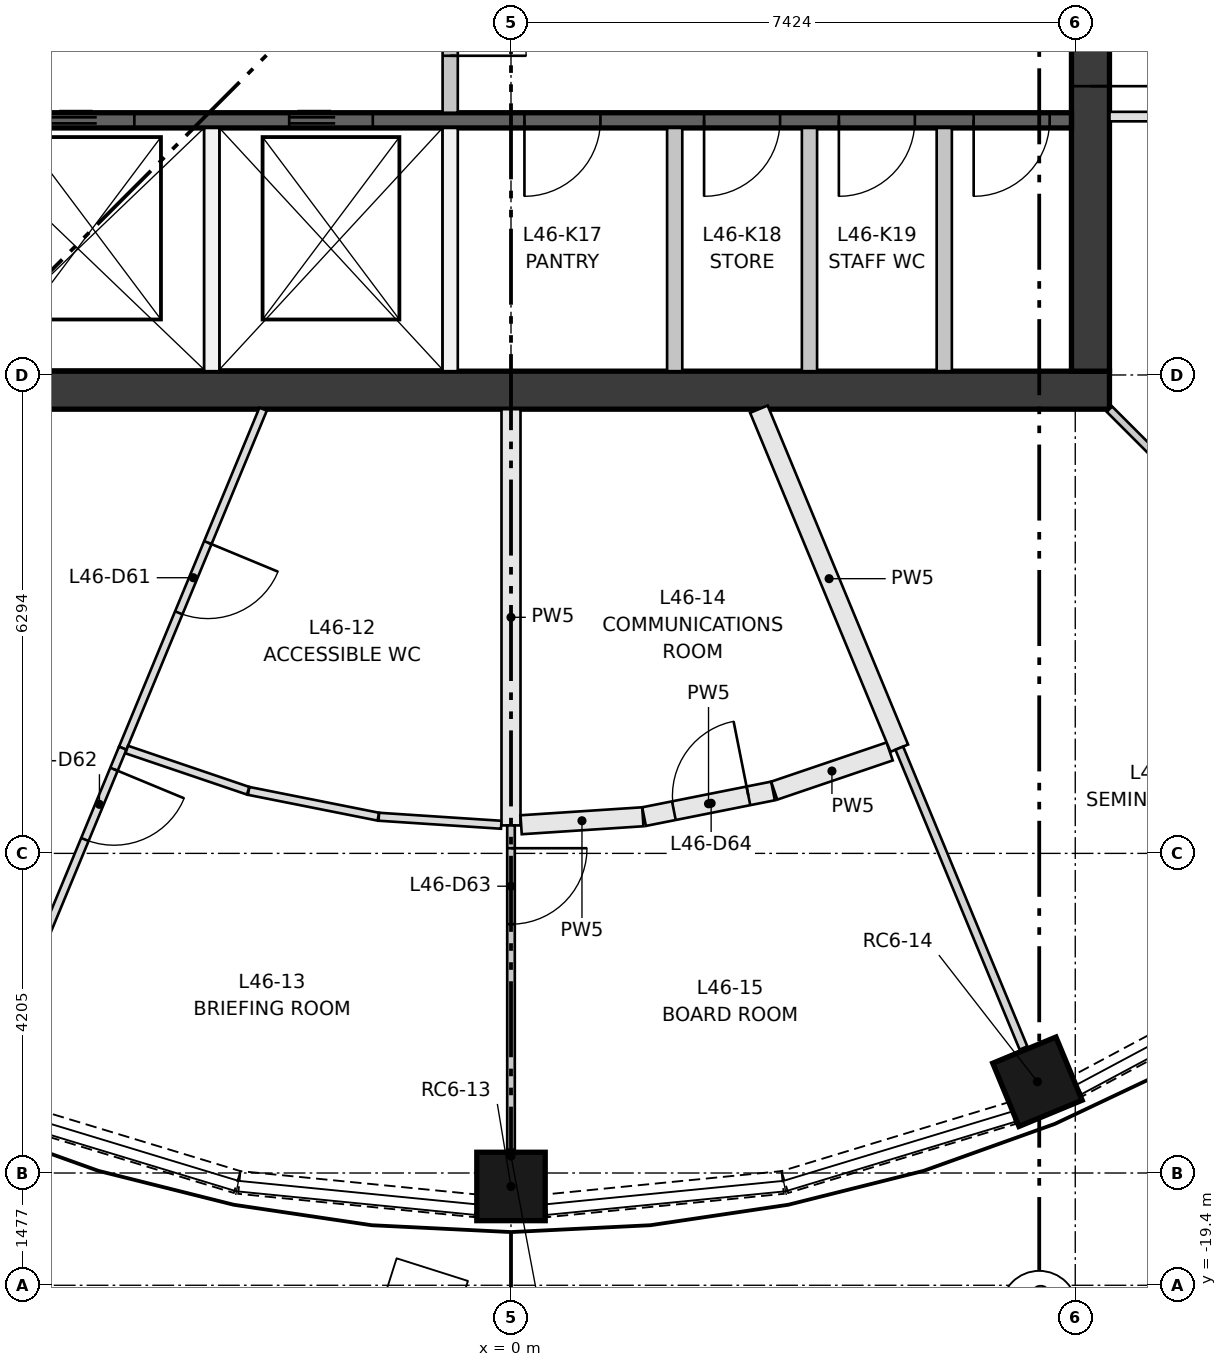
"""IFC4 building model, lengths in metres.
Left out: names, types, materials, properties, quantities, classifications, styles, units other than length and angle.
Written with IfcOpenShell. Run it as: python <this file> out.ifc"""

import sys

from ifc_helpers import new_model, si_unit, direction, frame, frame_2d, origin, origin_2d, place, context, subcontext, project, spatial, rectangle, extrude, element, fill, save


model = new_model("IFC4")
c1 = context("Model", 3, precision=1e-05, world=origin(), true_north=direction((0.0, 1.0)))
c2 = subcontext(c1, "Body", "Model", "MODEL_VIEW")
j1 = project(units=[si_unit("LENGTHUNIT", "METRE"), si_unit("PLANEANGLEUNIT", "RADIAN")], contexts=[c1])
p1 = place(None, origin())
s1 = spatial("IfcSite", under=j1, at=p1, CompositionType="ELEMENT")
p2 = place(p1, origin())
s2 = spatial("IfcBuilding", under=s1, at=p2, CompositionType="ELEMENT")
p3 = place(p2, frame((0.0, 0.0, 174.25)))
s3 = spatial("IfcBuildingStorey", under=s2, at=p3, CompositionType="ELEMENT", Elevation=174.25)
for number, where, z_axis, x_axis in (
    (1, (0.0, -18.1, 0.0), (0.0, 0.0, 1.0), (0.0, -1.0, 0.0)),
    (2, (6.927, -16.722, 0.0), (0.0, 0.0, 1.0), (0.383, -0.924, 0.0)),
):
    element("IfcColumn", number, at=place(p3, frame(where, z_axis=z_axis, x_axis=x_axis)), inside=s3, PredefinedType="COLUMN", context=c2, shape_type="SweptSolid", body=[
        extrude(rectangle(XDim=0.9, YDim=0.9, at=origin_2d()), origin(), (0.0, 0.0, 1.0), 3.35),
    ])
p4 = place(p3, frame((-7.874, -7.624, 0.0), z_axis=(0.0, 0.0, 1.0), x_axis=(1.0, 0.0, 0.0)))
e3 = element("IfcWall", 3, at=p4, inside=s3, PredefinedType="SHEAR", context=c2, shape_type="SweptSolid", body=[
    extrude(rectangle(XDim=15.748, YDim=0.5, at=frame_2d((7.874, 0.0))), origin(), (0.0, 0.0, 1.0), 3.35),
])
p5 = place(p3, frame((7.624, -7.374, 0.0), z_axis=(0.0, 0.0, 1.0), x_axis=(0.0, 1.0, 0.0)))
e4 = element("IfcWall", 4, at=p5, inside=s3, PredefinedType="SHEAR", context=c2, shape_type="SweptSolid", body=[
    extrude(rectangle(XDim=14.748, YDim=0.5, at=frame_2d((7.374, 0.0))), origin(), (0.0, 0.0, 1.0), 3.35),
])
p6 = place(p5, frame((6.874, 0.0, 0.0)))
e5 = element("IfcOpeningElement", 5, at=p6, cuts=e4, PredefinedType="OPENING", context=c2, shape_type="SweptSolid", body=[
    extrude(rectangle(XDim=1.0, YDim=2.1, at=frame_2d((0.5, 1.05))), frame((0.0, 0.26, 0.0), z_axis=(0.0, -1.0, 0.0), x_axis=(1.0, 0.0, 0.0)), (0.0, 0.0, 1.0), 0.52),
])
p7 = place(p5, frame((3.75, 0.0, 0.0)))
e6 = element("IfcOpeningElement", 6, at=p7, cuts=e4, PredefinedType="OPENING", context=c2, shape_type="SweptSolid", body=[
    extrude(rectangle(XDim=1.8, YDim=2.1, at=frame_2d((0.9, 1.05))), frame((0.0, 0.26, 0.0), z_axis=(0.0, -1.0, 0.0), x_axis=(1.0, 0.0, 0.0)), (0.0, 0.0, 1.0), 0.52),
])
p8 = place(p5, frame((9.198, 0.0, 0.0)))
e7 = element("IfcOpeningElement", 7, at=p8, cuts=e4, PredefinedType="OPENING", context=c2, shape_type="SweptSolid", body=[
    extrude(rectangle(XDim=1.8, YDim=2.1, at=frame_2d((0.9, 1.05))), frame((0.0, 0.26, 0.0), z_axis=(0.0, -1.0, 0.0), x_axis=(1.0, 0.0, 0.0)), (0.0, 0.0, 1.0), 0.52),
])
p9 = place(p3, frame((-7.374, -4.074, 0.0), z_axis=(0.0, 0.0, 1.0), x_axis=(1.0, 0.0, 0.0)))
e8 = element("IfcWall", 8, at=p9, inside=s3, PredefinedType="SHEAR", context=c2, shape_type="SweptSolid", body=[
    extrude(rectangle(XDim=14.748, YDim=0.2, at=frame_2d((7.374, 0.0))), origin(), (0.0, 0.0, 1.0), 3.0),
])
p10 = place(p9, frame((1.319, 0.0, 0.0)))
e9 = element("IfcOpeningElement", 9, at=p10, cuts=e8, PredefinedType="OPENING", context=c2, shape_type="SweptSolid", body=[
    extrude(rectangle(XDim=1.1, YDim=2.1, at=frame_2d((0.55, 1.05))), frame((0.0, 0.11, 0.0), z_axis=(0.0, -1.0, 0.0), x_axis=(1.0, 0.0, 0.0)), (0.0, 0.0, 1.0), 0.22),
])
p11 = place(p9, frame((4.456, 0.0, 0.0)))
e10 = element("IfcOpeningElement", 10, at=p11, cuts=e8, PredefinedType="OPENING", context=c2, shape_type="SweptSolid", body=[
    extrude(rectangle(XDim=1.1, YDim=2.1, at=frame_2d((0.55, 1.05))), frame((0.0, 0.11, 0.0), z_axis=(0.0, -1.0, 0.0), x_axis=(1.0, 0.0, 0.0)), (0.0, 0.0, 1.0), 0.22),
])
p12 = place(p9, frame((7.551, 0.0, 0.0)))
e11 = element("IfcOpeningElement", 11, at=p12, cuts=e8, PredefinedType="OPENING", context=c2, shape_type="SweptSolid", body=[
    extrude(rectangle(XDim=1.0, YDim=2.1, at=frame_2d((0.5, 1.05))), frame((0.0, 0.11, 0.0), z_axis=(0.0, -1.0, 0.0), x_axis=(1.0, 0.0, 0.0)), (0.0, 0.0, 1.0), 0.22),
])
p13 = place(p9, frame((9.914, 0.0, 0.0)))
e12 = element("IfcOpeningElement", 12, at=p13, cuts=e8, PredefinedType="OPENING", context=c2, shape_type="SweptSolid", body=[
    extrude(rectangle(XDim=1.0, YDim=2.1, at=frame_2d((0.5, 1.05))), frame((0.0, 0.11, 0.0), z_axis=(0.0, -1.0, 0.0), x_axis=(1.0, 0.0, 0.0)), (0.0, 0.0, 1.0), 0.22),
])
p14 = place(p9, frame((11.688, 0.0, 0.0)))
e13 = element("IfcOpeningElement", 13, at=p14, cuts=e8, PredefinedType="OPENING", context=c2, shape_type="SweptSolid", body=[
    extrude(rectangle(XDim=1.0, YDim=2.1, at=frame_2d((0.5, 1.05))), frame((0.0, 0.11, 0.0), z_axis=(0.0, -1.0, 0.0), x_axis=(1.0, 0.0, 0.0)), (0.0, 0.0, 1.0), 0.22),
])
p15 = place(p9, frame((13.461, 0.0, 0.0)))
e14 = element("IfcOpeningElement", 14, at=p15, cuts=e8, PredefinedType="OPENING", context=c2, shape_type="SweptSolid", body=[
    extrude(rectangle(XDim=1.0, YDim=2.1, at=frame_2d((0.5, 1.05))), frame((0.0, 0.11, 0.0), z_axis=(0.0, -1.0, 0.0), x_axis=(1.0, 0.0, 0.0)), (0.0, 0.0, 1.0), 0.22),
])
for number, where, z_axis, x_axis in (
    (15, (-3.937, -7.374, 0.0), (0.0, 0.0, 1.0), (0.0, 1.0, 0.0)),
    (16, (-0.8, -7.374, 0.0), (0.0, 0.0, 1.0), (0.0, 1.0, 0.0)),
):
    element("IfcWall", number, at=place(p3, frame(where, z_axis=z_axis, x_axis=x_axis)), inside=s3, PredefinedType="PARTITIONING", context=c2, shape_type="SweptSolid", body=[
        extrude(rectangle(XDim=3.2, YDim=0.2, at=frame_2d((1.6, 0.0))), origin(), (0.0, 0.0, 1.0), 3.0),
    ])
p16 = place(p3, frame((-0.8, -3.974, 0.0), z_axis=(0.0, 0.0, 1.0), x_axis=(0.0, 1.0, 0.0)))
e17 = element("IfcWall", 17, at=p16, inside=s3, PredefinedType="PARTITIONING", context=c2, shape_type="SweptSolid", body=[
    extrude(rectangle(XDim=2.499, YDim=0.2, at=frame_2d((1.25, 0.0))), origin(), (0.0, 0.0, 1.0), 3.0),
])
p17 = place(p16, frame((0.75, 0.0, 0.0)))
e18 = element("IfcOpeningElement", 18, at=p17, cuts=e17, PredefinedType="OPENING", context=c2, shape_type="SweptSolid", body=[
    extrude(rectangle(XDim=1.0, YDim=2.1, at=frame_2d((0.5, 1.05))), frame((0.0, 0.11, 0.0), z_axis=(0.0, -1.0, 0.0), x_axis=(1.0, 0.0, 0.0)), (0.0, 0.0, 1.0), 0.22),
])
for number, where, z_axis, x_axis in (
    (19, (2.154, -7.374, 0.0), (0.0, 0.0, 1.0), (0.0, 1.0, 0.0)),
    (20, (3.927, -7.374, 0.0), (0.0, 0.0, 1.0), (0.0, 1.0, 0.0)),
    (21, (5.7, -7.374, 0.0), (0.0, 0.0, 1.0), (0.0, 1.0, 0.0)),
):
    element("IfcWall", number, at=place(p3, frame(where, z_axis=z_axis, x_axis=x_axis)), inside=s3, PredefinedType="PARTITIONING", context=c2, shape_type="SweptSolid", body=[
        extrude(rectangle(XDim=3.2, YDim=0.2, at=frame_2d((1.6, 0.0))), origin(), (0.0, 0.0, 1.0), 3.0),
    ])
p18 = place(p3, frame((-6.596, -17.135, 0.0), z_axis=(0.0, 0.0, 1.0), x_axis=(0.957001416136, -0.290083245834, 0.0)))
e22 = element("IfcWall", 22, at=p18, inside=s3, PredefinedType="SOLIDWALL", context=c2, shape_type="SweptSolid", body=[
    extrude(rectangle(XDim=3.127, YDim=0.3, at=frame_2d((1.563, 0.0))), origin(), (0.0, 0.0, 1.0), 0.9),
])
for number, where, z_axis, x_axis in (
    (23, (-3.574, -18.048, 0.0), (0.0, 0.0, 1.0), (0.995, -0.098, 0.0)),
    (24, (0.464, -18.354, 0.0), (0.0, 0.0, 1.0), (0.995, 0.098, 0.0)),
):
    element("IfcWall", number, at=place(p3, frame(where, z_axis=z_axis, x_axis=x_axis)), inside=s3, PredefinedType="SOLIDWALL", context=c2, shape_type="SweptSolid", body=[
        extrude(rectangle(XDim=3.125, YDim=0.3, at=frame_2d((1.563, 0.0))), origin(), (0.0, 0.0, 1.0), 0.9),
    ])
p19 = place(p3, frame((3.604, -18.042, 0.0), z_axis=(0.0, 0.0, 1.0), x_axis=(0.957001416136, 0.290083245834, 0.0)))
e25 = element("IfcWall", 25, at=p19, inside=s3, PredefinedType="SOLIDWALL", context=c2, shape_type="SweptSolid", body=[
    extrude(rectangle(XDim=3.127, YDim=0.3, at=frame_2d((1.563, 0.0))), origin(), (0.0, 0.0, 1.0), 0.9),
])
p20 = place(p3, frame((7.452, -16.779, 0.0), z_axis=(0.0, 0.0, 1.0), x_axis=(0.882024038027, 0.47120441036, 0.0)))
e26 = element("IfcWall", 26, at=p20, inside=s3, PredefinedType="SOLIDWALL", context=c2, shape_type="SweptSolid", body=[
    extrude(rectangle(XDim=3.125, YDim=0.3, at=frame_2d((1.562, 0.0))), origin(), (0.0, 0.0, 1.0), 0.9),
])
p21 = place(p3, frame((12.615, -4.024, 0.0), z_axis=(0.0, 0.0, 1.0), x_axis=(-1.0, 0.0, 0.0)))
e27 = element("IfcWall", 27, at=p21, inside=s3, PredefinedType="PARTITIONING", context=c2, shape_type="SweptSolid", body=[
    extrude(rectangle(XDim=4.741, YDim=0.125, at=frame_2d((2.37, 0.0))), origin(), (0.0, 0.0, 1.0), 3.0),
])
p22 = place(p21, frame((1.9, 0.0, 0.0)))
e28 = element("IfcOpeningElement", 28, at=p22, cuts=e27, PredefinedType="OPENING", context=c2, shape_type="SweptSolid", body=[
    extrude(rectangle(XDim=1.0, YDim=2.1, at=frame_2d((0.5, 1.05))), frame((0.0, 0.073, 0.0), z_axis=(0.0, -1.0, 0.0), x_axis=(1.0, 0.0, 0.0)), (0.0, 0.0, 1.0), 0.145),
])
p23 = place(p3, frame((-3.261, -7.874, 0.0), z_axis=(0.0, 0.0, 1.0), x_axis=(-0.382707643949, -0.923869503373, 0.0)))
e29 = element("IfcWall", 29, at=p23, inside=s3, PredefinedType="PARTITIONING", context=c2, shape_type="SweptSolid", body=[
    extrude(rectangle(XDim=4.827, YDim=0.105, at=frame_2d((2.414, 0.0))), origin(), (0.0, 0.0, 1.0), 3.0),
])
p24 = place(p23, frame((1.9, 0.0, 0.0)))
e30 = element("IfcOpeningElement", 30, at=p24, cuts=e29, PredefinedType="OPENING", context=c2, shape_type="SweptSolid", body=[
    extrude(rectangle(XDim=1.0, YDim=2.1, at=frame_2d((0.5, 1.05))), frame((0.0, 0.062, 0.0), z_axis=(0.0, -1.0, 0.0), x_axis=(1.0, 0.0, 0.0)), (0.0, 0.0, 1.0), 0.125),
])
p25 = place(p3, frame((-5.109, -12.334, 0.0), z_axis=(0.0, 0.0, 1.0), x_axis=(-0.382669916503, -0.923885130849, 0.0)))
e31 = element("IfcWall", 31, at=p25, inside=s3, PredefinedType="PARTITIONING", context=c2, shape_type="SweptSolid", body=[
    extrude(rectangle(XDim=4.27, YDim=0.105, at=frame_2d((2.135, 0.0))), origin(), (0.0, 0.0, 1.0), 3.0),
])
p26 = place(p25, frame((0.3, 0.0, 0.0)))
e32 = element("IfcOpeningElement", 32, at=p26, cuts=e31, PredefinedType="OPENING", context=c2, shape_type="SweptSolid", body=[
    extrude(rectangle(XDim=1.0, YDim=2.1, at=frame_2d((0.5, 1.05))), frame((0.0, 0.062, 0.0), z_axis=(0.0, -1.0, 0.0), x_axis=(1.0, 0.0, 0.0)), (0.0, 0.0, 1.0), 0.125),
])
p27 = place(p3, frame((-3.458, -12.894, 0.0), z_axis=(0.0, 0.0, 1.0), x_axis=(-0.946917341597, 0.321477134773, 0.0)))
e33 = element("IfcWall", 33, at=p27, inside=s3, PredefinedType="PARTITIONING", context=c2, shape_type="SweptSolid", body=[
    extrude(rectangle(XDim=1.687, YDim=0.105, at=frame_2d((0.843, 0.0))), origin(), (0.0, 0.0, 1.0), 3.0),
])
p28 = place(p3, frame((-1.746, -13.235, 0.0), z_axis=(0.0, 0.0, 1.0), x_axis=(-0.980785270285, 0.195090372882, 0.0)))
e34 = element("IfcWall", 34, at=p28, inside=s3, PredefinedType="PARTITIONING", context=c2, shape_type="SweptSolid", body=[
    extrude(rectangle(XDim=1.74, YDim=0.105, at=frame_2d((0.87, 0.0))), origin(), (0.0, 0.0, 1.0), 3.0),
])
p29 = place(p3, frame((-0.128, -13.342, 0.0), z_axis=(0.0, 0.0, 1.0), x_axis=(-0.997862773684, 0.065344356258, 0.0)))
e35 = element("IfcWall", 35, at=p29, inside=s3, PredefinedType="PARTITIONING", context=c2, shape_type="SweptSolid", body=[
    extrude(rectangle(XDim=1.614, YDim=0.105, at=frame_2d((0.807, 0.0))), origin(), (0.0, 0.0, 1.0), 3.0),
])
p30 = place(p3, frame((0.0, -7.874, 0.0), z_axis=(0.0, 0.0, 1.0), x_axis=(0.0, -1.0, 0.0)))
e36 = element("IfcWall", 36, at=p30, inside=s3, PredefinedType="PARTITIONING", context=c2, shape_type="SweptSolid", body=[
    extrude(rectangle(XDim=5.476, YDim=0.25, at=frame_2d((2.738, 0.0))), origin(), (0.0, 0.0, 1.0), 3.0),
])
p31 = place(p3, frame((0.0, -13.35, 0.0), z_axis=(0.0, 0.0, 1.0), x_axis=(0.0, -1.0, 0.0)))
e37 = element("IfcWall", 37, at=p31, inside=s3, PredefinedType="PARTITIONING", context=c2, shape_type="SweptSolid", body=[
    extrude(rectangle(XDim=4.27, YDim=0.1, at=frame_2d((2.135, 0.0))), origin(), (0.0, 0.0, 1.0), 3.0),
])
p32 = place(p31, frame((0.3, 0.0, 0.0)))
e38 = element("IfcOpeningElement", 38, at=p32, cuts=e37, PredefinedType="OPENING", context=c2, shape_type="SweptSolid", body=[
    extrude(rectangle(XDim=1.0, YDim=2.1, at=frame_2d((0.5, 1.05))), frame((0.0, 0.06, 0.0), z_axis=(0.0, -1.0, 0.0), x_axis=(1.0, 0.0, 0.0)), (0.0, 0.0, 1.0), 0.12),
])
p33 = place(p3, frame((1.734, -13.236, 0.0), z_axis=(0.0, 0.0, 1.0), x_axis=(-0.997857274773, -0.065428275107, 0.0)))
e39 = element("IfcWall", 39, at=p33, inside=s3, PredefinedType="PARTITIONING", context=c2, shape_type="SweptSolid", body=[
    extrude(rectangle(XDim=1.604, YDim=0.25, at=frame_2d((0.802, 0.0))), origin(), (0.0, 0.0, 1.0), 3.0),
])
p34 = place(p3, frame((1.75, -13.234, 0.0), z_axis=(0.0, 0.0, 1.0), x_axis=(0.98079718542, 0.195030461907, 0.0)))
e40 = element("IfcWall", 40, at=p34, inside=s3, PredefinedType="PARTITIONING", context=c2, shape_type="SweptSolid", body=[
    extrude(rectangle(XDim=1.73, YDim=0.25, at=frame_2d((0.865, 0.0))), origin(), (0.0, 0.0, 1.0), 3.0),
])
p35 = place(p34, frame((0.4, 0.0, 0.0)))
e41 = element("IfcOpeningElement", 41, at=p35, cuts=e40, PredefinedType="OPENING", context=c2, shape_type="SweptSolid", body=[
    extrude(rectangle(XDim=1.0, YDim=2.1, at=frame_2d((0.5, 1.05))), frame((0.0, 0.135, 0.0), z_axis=(0.0, -1.0, 0.0), x_axis=(1.0, 0.0, 0.0)), (0.0, 0.0, 1.0), 0.27),
])
p36 = place(p3, frame((4.982, -12.377, 0.0), z_axis=(0.0, 0.0, 1.0), x_axis=(-0.946919168061, -0.321471754838, 0.0)))
e42 = element("IfcWall", 42, at=p36, inside=s3, PredefinedType="PARTITIONING", context=c2, shape_type="SweptSolid", body=[
    extrude(rectangle(XDim=1.605, YDim=0.25, at=frame_2d((0.802, 0.0))), origin(), (0.0, 0.0, 1.0), 3.0),
])
p37 = place(p3, frame((3.261, -7.874, 0.0), z_axis=(0.0, 0.0, 1.0), x_axis=(0.382707643949, -0.923869503373, 0.0)))
e43 = element("IfcWall", 43, at=p37, inside=s3, PredefinedType="PARTITIONING", context=c2, shape_type="SweptSolid", body=[
    extrude(rectangle(XDim=4.827, YDim=0.25, at=frame_2d((2.414, 0.0))), origin(), (0.0, 0.0, 1.0), 3.0),
])
p38 = place(p3, frame((5.109, -12.334, 0.0), z_axis=(0.0, 0.0, 1.0), x_axis=(0.382669916503, -0.923885130849, 0.0)))
e44 = element("IfcWall", 44, at=p38, inside=s3, PredefinedType="PARTITIONING", context=c2, shape_type="SweptSolid", body=[
    extrude(rectangle(XDim=4.27, YDim=0.11, at=frame_2d((2.135, 0.0))), origin(), (0.0, 0.0, 1.0), 3.0),
])
p39 = place(p3, frame((12.459, -12.459, 0.0), z_axis=(0.0, 0.0, 1.0), x_axis=(-0.707106781187, 0.707106781187, 0.0)))
e45 = element("IfcWall", 45, at=p39, inside=s3, PredefinedType="PARTITIONING", context=c2, shape_type="SweptSolid", body=[
    extrude(rectangle(XDim=6.484, YDim=0.1, at=frame_2d((3.242, 0.0))), origin(), (0.0, 0.0, 1.0), 3.0),
])
p40 = place(p39, frame((3.0, 0.0, 0.0)))
e46 = element("IfcOpeningElement", 46, at=p40, cuts=e45, PredefinedType="OPENING", context=c2, shape_type="SweptSolid", body=[
    extrude(rectangle(XDim=1.0, YDim=2.1, at=frame_2d((0.5, 1.05))), frame((0.0, 0.06, 0.0), z_axis=(0.0, -1.0, 0.0), x_axis=(1.0, 0.0, 0.0)), (0.0, 0.0, 1.0), 0.12),
])
p41 = place(p10, origin())
e47 = element("IfcDoor", 47, at=p41, inside=s3, OperationType="DOUBLE_DOOR_SLIDING", PredefinedType="DOOR", context=c2, shape_type="SweptSolid", body=[
    extrude(rectangle(XDim=1.1, YDim=2.1, at=frame_2d((0.55, 1.05))), frame((0.0, 0.025, 0.0), z_axis=(0.0, -1.0, 0.0), x_axis=(1.0, 0.0, 0.0)), (0.0, 0.0, 1.0), 0.05),
])
fill(e9, e47)
p42 = place(p11, origin())
e48 = element("IfcDoor", 48, at=p42, inside=s3, OperationType="DOUBLE_DOOR_SLIDING", PredefinedType="DOOR", context=c2, shape_type="SweptSolid", body=[
    extrude(rectangle(XDim=1.1, YDim=2.1, at=frame_2d((0.55, 1.05))), frame((0.0, 0.025, 0.0), z_axis=(0.0, -1.0, 0.0), x_axis=(1.0, 0.0, 0.0)), (0.0, 0.0, 1.0), 0.05),
])
fill(e10, e48)
p43 = place(p17, frame((1.0, 0.0, 0.0), z_axis=(0.0, 0.0, 1.0), x_axis=(-1.0, 0.0, 0.0)))
e49 = element("IfcDoor", 49, at=p43, inside=s3, OperationType="SINGLE_SWING_LEFT", PredefinedType="DOOR", context=c2, shape_type="SweptSolid", body=[
    extrude(rectangle(XDim=1.0, YDim=2.1, at=frame_2d((0.5, 1.05))), frame((0.0, 0.025, 0.0), z_axis=(0.0, -1.0, 0.0), x_axis=(1.0, 0.0, 0.0)), (0.0, 0.0, 1.0), 0.05),
])
fill(e18, e49)
p44 = place(p12, frame((1.0, 0.0, 0.0), z_axis=(0.0, 0.0, 1.0), x_axis=(-1.0, 0.0, 0.0)))
e50 = element("IfcDoor", 50, at=p44, inside=s3, OperationType="SINGLE_SWING_LEFT", PredefinedType="DOOR", context=c2, shape_type="SweptSolid", body=[
    extrude(rectangle(XDim=1.0, YDim=2.1, at=frame_2d((0.5, 1.05))), frame((0.0, 0.025, 0.0), z_axis=(0.0, -1.0, 0.0), x_axis=(1.0, 0.0, 0.0)), (0.0, 0.0, 1.0), 0.05),
])
fill(e11, e50)
p45 = place(p13, frame((1.0, 0.0, 0.0), z_axis=(0.0, 0.0, 1.0), x_axis=(-1.0, 0.0, 0.0)))
e51 = element("IfcDoor", 51, at=p45, inside=s3, OperationType="SINGLE_SWING_LEFT", PredefinedType="DOOR", context=c2, shape_type="SweptSolid", body=[
    extrude(rectangle(XDim=1.0, YDim=2.1, at=frame_2d((0.5, 1.05))), frame((0.0, 0.025, 0.0), z_axis=(0.0, -1.0, 0.0), x_axis=(1.0, 0.0, 0.0)), (0.0, 0.0, 1.0), 0.05),
])
fill(e12, e51)
p46 = place(p14, frame((1.0, 0.0, 0.0), z_axis=(0.0, 0.0, 1.0), x_axis=(-1.0, 0.0, 0.0)))
e52 = element("IfcDoor", 52, at=p46, inside=s3, OperationType="SINGLE_SWING_LEFT", PredefinedType="DOOR", context=c2, shape_type="SweptSolid", body=[
    extrude(rectangle(XDim=1.0, YDim=2.1, at=frame_2d((0.5, 1.05))), frame((0.0, 0.025, 0.0), z_axis=(0.0, -1.0, 0.0), x_axis=(1.0, 0.0, 0.0)), (0.0, 0.0, 1.0), 0.05),
])
fill(e13, e52)
p47 = place(p15, frame((1.0, 0.0, 0.0), z_axis=(0.0, 0.0, 1.0), x_axis=(-1.0, 0.0, 0.0)))
e53 = element("IfcDoor", 53, at=p47, inside=s3, OperationType="SINGLE_SWING_LEFT", PredefinedType="DOOR", context=c2, shape_type="SweptSolid", body=[
    extrude(rectangle(XDim=1.0, YDim=2.1, at=frame_2d((0.5, 1.05))), frame((0.0, 0.025, 0.0), z_axis=(0.0, -1.0, 0.0), x_axis=(1.0, 0.0, 0.0)), (0.0, 0.0, 1.0), 0.05),
])
fill(e14, e53)
p48 = place(p7, frame((1.8, 0.0, 0.0), z_axis=(0.0, 0.0, 1.0), x_axis=(-1.0, 0.0, 0.0)))
e54 = element("IfcDoor", 54, at=p48, inside=s3, OperationType="DOUBLE_DOOR_SINGLE_SWING", PredefinedType="DOOR", context=c2, shape_type="SweptSolid", body=[
    extrude(rectangle(XDim=1.8, YDim=2.1, at=frame_2d((0.9, 1.05))), frame((0.0, 0.025, 0.0), z_axis=(0.0, -1.0, 0.0), x_axis=(1.0, 0.0, 0.0)), (0.0, 0.0, 1.0), 0.05),
])
fill(e6, e54)
p49 = place(p24, origin())
e55 = element("IfcDoor", 55, at=p49, inside=s3, OperationType="SINGLE_SWING_LEFT", PredefinedType="DOOR", context=c2, shape_type="SweptSolid", body=[
    extrude(rectangle(XDim=1.0, YDim=2.1, at=frame_2d((0.5, 1.05))), frame((0.0, 0.025, 0.0), z_axis=(0.0, -1.0, 0.0), x_axis=(1.0, 0.0, 0.0)), (0.0, 0.0, 1.0), 0.05),
])
fill(e30, e55)
p50 = place(p26, origin())
e56 = element("IfcDoor", 56, at=p50, inside=s3, OperationType="SINGLE_SWING_LEFT", PredefinedType="DOOR", context=c2, shape_type="SweptSolid", body=[
    extrude(rectangle(XDim=1.0, YDim=2.1, at=frame_2d((0.5, 1.05))), frame((0.0, 0.025, 0.0), z_axis=(0.0, -1.0, 0.0), x_axis=(1.0, 0.0, 0.0)), (0.0, 0.0, 1.0), 0.05),
])
fill(e32, e56)
p51 = place(p32, origin())
e57 = element("IfcDoor", 57, at=p51, inside=s3, OperationType="SINGLE_SWING_LEFT", PredefinedType="DOOR", context=c2, shape_type="SweptSolid", body=[
    extrude(rectangle(XDim=1.0, YDim=2.1, at=frame_2d((0.5, 1.05))), frame((0.0, 0.025, 0.0), z_axis=(0.0, -1.0, 0.0), x_axis=(1.0, 0.0, 0.0)), (0.0, 0.0, 1.0), 0.05),
])
fill(e38, e57)
p52 = place(p35, origin())
e58 = element("IfcDoor", 58, at=p52, inside=s3, OperationType="SINGLE_SWING_RIGHT", PredefinedType="DOOR", context=c2, shape_type="SweptSolid", body=[
    extrude(rectangle(XDim=1.0, YDim=2.1, at=frame_2d((0.5, 1.05))), frame((0.0, 0.025, 0.0), z_axis=(0.0, -1.0, 0.0), x_axis=(1.0, 0.0, 0.0)), (0.0, 0.0, 1.0), 0.05),
])
fill(e41, e58)
save(model, sys.argv[1])
